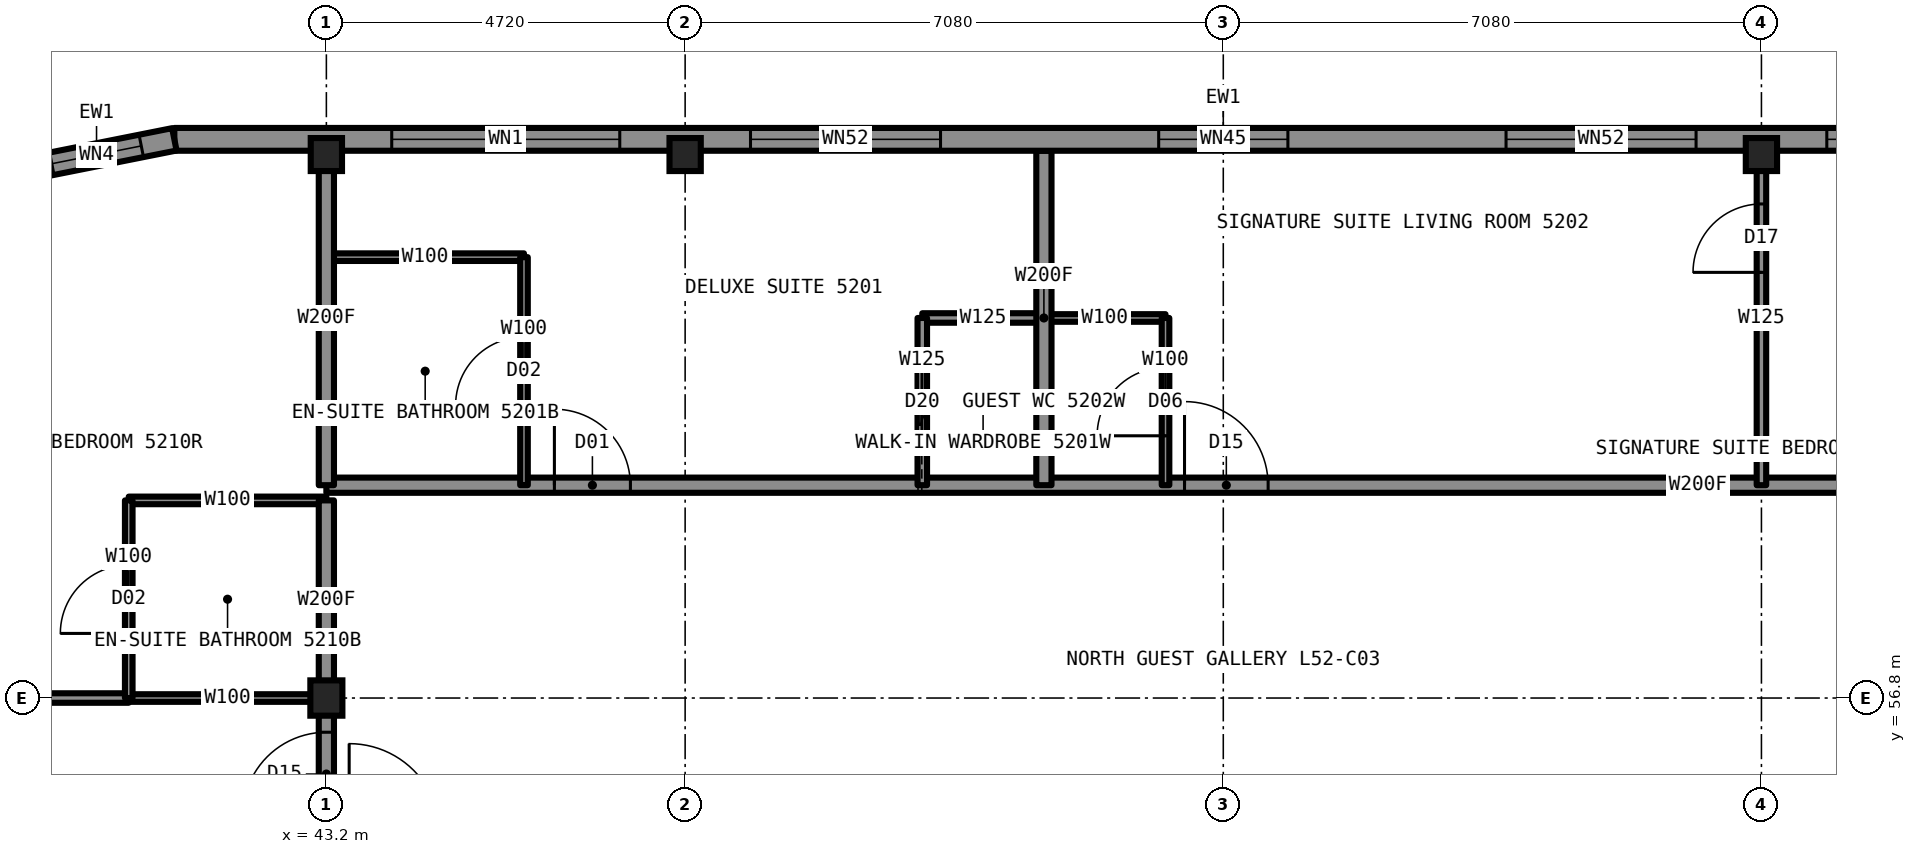
"""IFC4 building model, lengths in metres.
Left out: names, types, materials, properties, quantities, classifications, styles, units other than length and angle.
Written with IfcOpenShell. Run it as: python <this file> out.ifc"""

import sys

from ifc_helpers import new_model, si_unit, direction, frame, frame_2d, origin, origin_2d, place, context, subcontext, project, spatial, rectangle, i_section, extrude, element, fill, save


model = new_model("IFC4")
c1 = context("Model", 3, precision=1e-05, world=origin(), true_north=direction((0.0, 1.0)))
c2 = subcontext(c1, "Body", "Model", "MODEL_VIEW")
j1 = project(units=[si_unit("LENGTHUNIT", "METRE"), si_unit("PLANEANGLEUNIT", "RADIAN")], contexts=[c1])
p1 = place(None, origin())
s1 = spatial("IfcSite", under=j1, at=p1, CompositionType="ELEMENT")
p2 = place(p1, origin())
s2 = spatial("IfcBuilding", under=s1, at=p2, CompositionType="ELEMENT")
p3 = place(p2, frame((0.0, 0.0, 193.3)))
s3 = spatial("IfcBuildingStorey", under=s2, at=p3, CompositionType="ELEMENT", Elevation=193.3)
for number, where, z_axis, x_axis in (
    (1, (43.2, 63.95, 0.0), (0.0, 0.0, 1.0), (1.0, 0.0, 0.0)),
    (2, (47.92, 63.95, 0.0), (0.0, 0.0, 1.0), (1.0, 0.0, 0.0)),
    (3, (62.08, 63.95, 0.0), (0.0, 0.0, 1.0), (1.0, 0.0, 0.0)),
):
    element("IfcColumn", number, at=place(p3, frame(where, z_axis=z_axis, x_axis=x_axis)), inside=s3, PredefinedType="COLUMN", context=c2, shape_type="SweptSolid", body=[
        extrude(i_section(OverallWidth=0.411, OverallDepth=0.434, WebThickness=0.036, FlangeThickness=0.057, at=origin_2d()), origin(), (0.0, 0.0, 1.0), 3.5),
    ])
p4 = place(p3, frame((43.2, 56.8, 0.0), z_axis=(0.0, 0.0, 1.0), x_axis=(1.0, 0.0, 0.0)))
e4 = element("IfcColumn", 4, at=p4, inside=s3, PredefinedType="COLUMN", context=c2, shape_type="SweptSolid", body=[
    extrude(i_section(OverallWidth=0.422, OverallDepth=0.465, WebThickness=0.045, FlangeThickness=0.073, at=origin_2d()), origin(), (0.0, 0.0, 1.0), 3.5),
])
p5 = place(p3, frame((40.6, 56.8, 0.0), z_axis=(0.0, 0.0, 1.0), x_axis=(1.0, 0.0, 0.0)))
e5 = element("IfcWall", 5, at=p5, inside=s3, PredefinedType="PARTITIONING", context=c2, shape_type="SweptSolid", body=[
    extrude(rectangle(XDim=2.6, YDim=0.1, at=frame_2d((1.3, 0.0))), origin(), (0.0, 0.0, 1.0), 2.573),
])
p6 = place(p3, frame((36.0, 56.8, 0.0), z_axis=(0.0, 0.0, 1.0), x_axis=(1.0, 0.0, 0.0)))
e6 = element("IfcWall", 6, at=p6, inside=s3, PredefinedType="PARTITIONING", context=c2, shape_type="SweptSolid", body=[
    extrude(rectangle(XDim=4.6, YDim=0.125, at=frame_2d((2.3, 0.0))), origin(), (0.0, 0.0, 1.0), 2.573),
])
p7 = place(p6, frame((2.55, 0.0, 0.0)))
e7 = element("IfcOpeningElement", 7, at=p7, cuts=e6, PredefinedType="OPENING", context=c2, shape_type="SweptSolid", body=[
    extrude(rectangle(XDim=0.9, YDim=2.2, at=frame_2d((0.45, 1.1))), frame((0.0, 0.073, 0.0), z_axis=(0.0, -1.0, 0.0), x_axis=(1.0, 0.0, 0.0)), (0.0, 0.0, 1.0), 0.145),
])
p8 = place(p3, frame((40.6, 59.4, 0.0), z_axis=(0.0, 0.0, 1.0), x_axis=(1.0, 0.0, 0.0)))
e8 = element("IfcWall", 8, at=p8, inside=s3, PredefinedType="PARTITIONING", context=c2, shape_type="SweptSolid", body=[
    extrude(rectangle(XDim=2.6, YDim=0.1, at=frame_2d((1.3, 0.0))), origin(), (0.0, 0.0, 1.0), 3.33),
])
p9 = place(p3, frame((43.2, 59.6, 0.0), z_axis=(0.0, 0.0, 1.0), x_axis=(1.0, 0.0, 0.0)))
e9 = element("IfcWall", 9, at=p9, inside=s3, PredefinedType="PARTITIONING", context=c2, shape_type="SweptSolid", body=[
    extrude(rectangle(XDim=23.6, YDim=0.2, at=frame_2d((11.8, 0.0))), origin(), (0.0, 0.0, 1.0), 3.33),
])
p10 = place(p9, frame((3.0, 0.0, 0.0)))
e10 = element("IfcOpeningElement", 10, at=p10, cuts=e9, PredefinedType="OPENING", context=c2, shape_type="SweptSolid", body=[
    extrude(rectangle(XDim=1.0, YDim=2.2, at=frame_2d((0.5, 1.1))), frame((0.0, 0.11, 0.0), z_axis=(0.0, -1.0, 0.0), x_axis=(1.0, 0.0, 0.0)), (0.0, 0.0, 1.0), 0.22),
])
p11 = place(p9, frame((11.29, 0.0, 0.0)))
e11 = element("IfcOpeningElement", 11, at=p11, cuts=e9, PredefinedType="OPENING", context=c2, shape_type="SweptSolid", body=[
    extrude(rectangle(XDim=1.1, YDim=2.2, at=frame_2d((0.55, 1.1))), frame((0.0, 0.11, 0.0), z_axis=(0.0, -1.0, 0.0), x_axis=(1.0, 0.0, 0.0)), (0.0, 0.0, 1.0), 0.22),
])
p12 = place(p3, frame((52.64, 61.8, 0.0), z_axis=(0.0, 0.0, 1.0), x_axis=(1.0, 0.0, 0.0)))
e12 = element("IfcWall", 12, at=p12, inside=s3, PredefinedType="PARTITIONING", context=c2, shape_type="SweptSolid", body=[
    extrude(rectangle(XDim=1.6, YDim=0.1, at=frame_2d((0.8, 0.0))), origin(), (0.0, 0.0, 1.0), 3.33),
])
p13 = place(p3, frame((51.04, 61.8, 0.0), z_axis=(0.0, 0.0, 1.0), x_axis=(1.0, 0.0, 0.0)))
e13 = element("IfcWall", 13, at=p13, inside=s3, PredefinedType="PARTITIONING", context=c2, shape_type="SweptSolid", body=[
    extrude(rectangle(XDim=1.6, YDim=0.125, at=frame_2d((0.8, 0.0))), origin(), (0.0, 0.0, 1.0), 3.33),
])
p14 = place(p3, frame((43.2, 62.6, 0.0), z_axis=(0.0, 0.0, 1.0), x_axis=(1.0, 0.0, 0.0)))
e14 = element("IfcWall", 14, at=p14, inside=s3, PredefinedType="PARTITIONING", context=c2, shape_type="SweptSolid", body=[
    extrude(rectangle(XDim=2.6, YDim=0.1, at=frame_2d((1.3, 0.0))), origin(), (0.0, 0.0, 1.0), 3.33),
])
p15 = place(p3, frame((54.24, 59.6, 0.0), z_axis=(0.0, 0.0, 1.0), x_axis=(0.0, 1.0, 0.0)))
e15 = element("IfcWall", 15, at=p15, inside=s3, PredefinedType="PARTITIONING", context=c2, shape_type="SweptSolid", body=[
    extrude(rectangle(XDim=2.2, YDim=0.1, at=frame_2d((1.1, 0.0))), origin(), (0.0, 0.0, 1.0), 3.33),
])
p16 = place(p15, frame((0.65, 0.0, 0.0)))
e16 = element("IfcOpeningElement", 16, at=p16, cuts=e15, PredefinedType="OPENING", context=c2, shape_type="SweptSolid", body=[
    extrude(rectangle(XDim=0.9, YDim=2.1, at=frame_2d((0.45, 1.05))), frame((0.0, 0.06, 0.0), z_axis=(0.0, -1.0, 0.0), x_axis=(1.0, 0.0, 0.0)), (0.0, 0.0, 1.0), 0.12),
])
p17 = place(p3, frame((43.2, 33.22, 0.0), z_axis=(0.0, 0.0, 1.0), x_axis=(0.0, 1.0, 0.0)))
e17 = element("IfcWall", 17, at=p17, inside=s3, PredefinedType="PARTITIONING", context=c2, shape_type="SweptSolid", body=[
    extrude(rectangle(XDim=23.56, YDim=0.2, at=frame_2d((11.78, 0.0))), origin(), (0.0, 0.0, 1.0), 3.33),
])
p18 = place(p17, frame((7.25, 0.0, 0.0)))
e18 = element("IfcOpeningElement", 18, at=p18, cuts=e17, PredefinedType="OPENING", context=c2, shape_type="SweptSolid", body=[
    extrude(rectangle(XDim=1.0, YDim=2.2, at=frame_2d((0.5, 1.1))), frame((0.0, 0.11, 0.0), z_axis=(0.0, -1.0, 0.0), x_axis=(1.0, 0.0, 0.0)), (0.0, 0.0, 1.0), 0.22),
])
p19 = place(p17, frame((12.42, 0.0, 0.0)))
e19 = element("IfcOpeningElement", 19, at=p19, cuts=e17, PredefinedType="OPENING", context=c2, shape_type="SweptSolid", body=[
    extrude(rectangle(XDim=1.0, YDim=2.2, at=frame_2d((0.5, 1.1))), frame((0.0, 0.11, 0.0), z_axis=(0.0, -1.0, 0.0), x_axis=(1.0, 0.0, 0.0)), (0.0, 0.0, 1.0), 0.22),
])
p20 = place(p17, frame((22.03, 0.0, 0.0)))
e20 = element("IfcOpeningElement", 20, at=p20, cuts=e17, PredefinedType="OPENING", context=c2, shape_type="SweptSolid", body=[
    extrude(rectangle(XDim=1.1, YDim=2.2, at=frame_2d((0.55, 1.1))), frame((0.0, 0.11, 0.0), z_axis=(0.0, -1.0, 0.0), x_axis=(1.0, 0.0, 0.0)), (0.0, 0.0, 1.0), 0.22),
])
p21 = place(p17, frame((0.63, 0.0, 0.0)))
e21 = element("IfcOpeningElement", 21, at=p21, cuts=e17, PredefinedType="OPENING", context=c2, shape_type="SweptSolid", body=[
    extrude(rectangle(XDim=1.1, YDim=2.2, at=frame_2d((0.55, 1.1))), frame((0.0, 0.11, 0.0), z_axis=(0.0, -1.0, 0.0), x_axis=(1.0, 0.0, 0.0)), (0.0, 0.0, 1.0), 0.22),
])
p22 = place(p3, frame((43.2, 59.6, 0.0), z_axis=(0.0, 0.0, 1.0), x_axis=(0.0, 1.0, 0.0)))
e22 = element("IfcWall", 22, at=p22, inside=s3, PredefinedType="PARTITIONING", context=c2, shape_type="SweptSolid", body=[
    extrude(rectangle(XDim=4.4, YDim=0.2, at=frame_2d((2.2, 0.0))), origin(), (0.0, 0.0, 1.0), 2.573),
])
p23 = place(p3, frame((40.6, 56.8, 0.0), z_axis=(0.0, 0.0, 1.0), x_axis=(0.0, 1.0, 0.0)))
e23 = element("IfcWall", 23, at=p23, inside=s3, PredefinedType="PARTITIONING", context=c2, shape_type="SweptSolid", body=[
    extrude(rectangle(XDim=2.6, YDim=0.1, at=frame_2d((1.3, 0.0))), origin(), (0.0, 0.0, 1.0), 3.33),
])
p24 = place(p23, frame((0.85, 0.0, 0.0)))
e24 = element("IfcOpeningElement", 24, at=p24, cuts=e23, PredefinedType="OPENING", context=c2, shape_type="SweptSolid", body=[
    extrude(rectangle(XDim=0.9, YDim=2.1, at=frame_2d((0.45, 1.05))), frame((0.0, 0.06, 0.0), z_axis=(0.0, -1.0, 0.0), x_axis=(1.0, 0.0, 0.0)), (0.0, 0.0, 1.0), 0.12),
])
p25 = place(p3, frame((52.64, 59.6, 0.0), z_axis=(0.0, 0.0, 1.0), x_axis=(0.0, 1.0, 0.0)))
e25 = element("IfcWall", 25, at=p25, inside=s3, PredefinedType="PARTITIONING", context=c2, shape_type="SweptSolid", body=[
    extrude(rectangle(XDim=4.4, YDim=0.2, at=frame_2d((2.2, 0.0))), origin(), (0.0, 0.0, 1.0), 3.33),
])
p26 = place(p3, frame((51.04, 59.6, 0.0), z_axis=(0.0, 0.0, 1.0), x_axis=(0.0, 1.0, 0.0)))
e26 = element("IfcWall", 26, at=p26, inside=s3, PredefinedType="PARTITIONING", context=c2, shape_type="SweptSolid", body=[
    extrude(rectangle(XDim=2.2, YDim=0.125, at=frame_2d((1.1, 0.0))), origin(), (0.0, 0.0, 1.0), 3.33),
])
p27 = place(p26, frame((0.7, 0.0, 0.0)))
e27 = element("IfcOpeningElement", 27, at=p27, cuts=e26, PredefinedType="OPENING", context=c2, shape_type="SweptSolid", body=[
    extrude(rectangle(XDim=0.8, YDim=2.1, at=frame_2d((0.4, 1.05))), frame((0.0, 0.073, 0.0), z_axis=(0.0, -1.0, 0.0), x_axis=(1.0, 0.0, 0.0)), (0.0, 0.0, 1.0), 0.145),
])
p28 = place(p3, frame((45.8, 59.6, 0.0), z_axis=(0.0, 0.0, 1.0), x_axis=(0.0, 1.0, 0.0)))
e28 = element("IfcWall", 28, at=p28, inside=s3, PredefinedType="PARTITIONING", context=c2, shape_type="SweptSolid", body=[
    extrude(rectangle(XDim=3.0, YDim=0.1, at=frame_2d((1.5, 0.0))), origin(), (0.0, 0.0, 1.0), 3.33),
])
p29 = place(p28, frame((1.05, 0.0, 0.0)))
e29 = element("IfcOpeningElement", 29, at=p29, cuts=e28, PredefinedType="OPENING", context=c2, shape_type="SweptSolid", body=[
    extrude(rectangle(XDim=0.9, YDim=2.1, at=frame_2d((0.45, 1.05))), frame((0.0, 0.06, 0.0), z_axis=(0.0, -1.0, 0.0), x_axis=(1.0, 0.0, 0.0)), (0.0, 0.0, 1.0), 0.12),
])
p30 = place(p3, frame((62.08, 59.6, 0.0), z_axis=(0.0, 0.0, 1.0), x_axis=(0.0, 1.0, 0.0)))
e30 = element("IfcWall", 30, at=p30, inside=s3, PredefinedType="PARTITIONING", context=c2, shape_type="SweptSolid", body=[
    extrude(rectangle(XDim=4.4, YDim=0.125, at=frame_2d((2.2, 0.0))), origin(), (0.0, 0.0, 1.0), 2.573),
])
p31 = place(p30, frame((2.8, 0.0, 0.0)))
e31 = element("IfcOpeningElement", 31, at=p31, cuts=e30, PredefinedType="OPENING", context=c2, shape_type="SweptSolid", body=[
    extrude(rectangle(XDim=0.9, YDim=2.2, at=frame_2d((0.45, 1.1))), frame((0.0, 0.073, 0.0), z_axis=(0.0, -1.0, 0.0), x_axis=(1.0, 0.0, 0.0)), (0.0, 0.0, 1.0), 0.145),
])
p32 = place(p3, frame((68.8, 64.15, 0.0), z_axis=(0.0, 0.0, 1.0), x_axis=(-1.0, 0.0, 0.0)))
e32 = element("IfcWall", 32, at=p32, inside=s3, PredefinedType="SOLIDWALL", context=c2, shape_type="SweptSolid", body=[
    extrude(rectangle(XDim=27.6, YDim=0.3, at=frame_2d((13.8, 0.0))), origin(), (0.0, 0.0, 1.0), 2.83),
])
p33 = place(p32, frame((2.86, 0.0, 0.3)))
e33 = element("IfcOpeningElement", 33, at=p33, cuts=e32, PredefinedType="OPENING", context=c2, shape_type="SweptSolid", body=[
    extrude(rectangle(XDim=3.0, YDim=2.0, at=frame_2d((1.5, 1.0))), frame((0.0, 0.16, 0.0), z_axis=(0.0, -1.0, 0.0), x_axis=(1.0, 0.0, 0.0)), (0.0, 0.0, 1.0), 0.32),
])
p34 = place(p32, frame((7.58, 0.0, 0.3)))
e34 = element("IfcOpeningElement", 34, at=p34, cuts=e32, PredefinedType="OPENING", context=c2, shape_type="SweptSolid", body=[
    extrude(rectangle(XDim=2.5, YDim=2.0, at=frame_2d((1.25, 1.0))), frame((0.0, 0.16, 0.0), z_axis=(0.0, -1.0, 0.0), x_axis=(1.0, 0.0, 0.0)), (0.0, 0.0, 1.0), 0.32),
])
p35 = place(p32, frame((12.95, 0.0, 1.0)))
e35 = element("IfcOpeningElement", 35, at=p35, cuts=e32, PredefinedType="OPENING", context=c2, shape_type="SweptSolid", body=[
    extrude(rectangle(XDim=1.7, YDim=1.3, at=frame_2d((0.85, 0.65))), frame((0.0, 0.16, 0.0), z_axis=(0.0, -1.0, 0.0), x_axis=(1.0, 0.0, 0.0)), (0.0, 0.0, 1.0), 0.32),
])
p36 = place(p32, frame((17.52, 0.0, 0.3)))
e36 = element("IfcOpeningElement", 36, at=p36, cuts=e32, PredefinedType="OPENING", context=c2, shape_type="SweptSolid", body=[
    extrude(rectangle(XDim=2.5, YDim=2.0, at=frame_2d((1.25, 1.0))), frame((0.0, 0.16, 0.0), z_axis=(0.0, -1.0, 0.0), x_axis=(1.0, 0.0, 0.0)), (0.0, 0.0, 1.0), 0.32),
])
p37 = place(p32, frame((21.74, 0.0, 0.3)))
e37 = element("IfcOpeningElement", 37, at=p37, cuts=e32, PredefinedType="OPENING", context=c2, shape_type="SweptSolid", body=[
    extrude(rectangle(XDim=3.0, YDim=2.0, at=frame_2d((1.5, 1.0))), frame((0.0, 0.16, 0.0), z_axis=(0.0, -1.0, 0.0), x_axis=(1.0, 0.0, 0.0)), (0.0, 0.0, 1.0), 0.32),
])
p38 = place(p3, frame((41.2, 64.15, 0.0), z_axis=(0.0, 0.0, 1.0), x_axis=(-0.980787050784, -0.195081421501, 0.0)))
e38 = element("IfcWall", 38, at=p38, inside=s3, PredefinedType="SOLIDWALL", context=c2, shape_type="SweptSolid", body=[
    extrude(rectangle(XDim=2.087, YDim=0.3, at=frame_2d((1.044, 0.0))), origin(), (0.0, 0.0, 1.0), 3.33),
])
p39 = place(p38, frame((0.444, 0.0, 0.3)))
e39 = element("IfcOpeningElement", 39, at=p39, cuts=e38, PredefinedType="OPENING", context=c2, shape_type="SweptSolid", body=[
    extrude(rectangle(XDim=1.2, YDim=2.0, at=frame_2d((0.6, 1.0))), frame((0.0, 0.16, 0.0), z_axis=(0.0, -1.0, 0.0), x_axis=(1.0, 0.0, 0.0)), (0.0, 0.0, 1.0), 0.32),
])
p40 = place(p3, frame((43.2, 56.78, 0.0), z_axis=(0.0, 0.0, 1.0), x_axis=(0.0, 1.0, 0.0)))
e40 = element("IfcWall", 40, at=p40, inside=s3, PredefinedType="PARTITIONING", context=c2, shape_type="SweptSolid", body=[
    extrude(rectangle(XDim=2.62, YDim=0.2, at=frame_2d((1.31, 0.0))), origin(), (0.0, 0.0, 1.0), 2.573),
])
p41 = place(p10, origin())
e41 = element("IfcDoor", 41, at=p41, inside=s3, OperationType="SINGLE_SWING_LEFT", PredefinedType="DOOR", context=c2, shape_type="SweptSolid", body=[
    extrude(rectangle(XDim=1.0, YDim=2.2, at=frame_2d((0.5, 1.1))), frame((0.0, 0.025, 0.0), z_axis=(0.0, -1.0, 0.0), x_axis=(1.0, 0.0, 0.0)), (0.0, 0.0, 1.0), 0.05),
])
fill(e10, e41)
p42 = place(p29, origin())
e42 = element("IfcDoor", 42, at=p42, inside=s3, OperationType="SINGLE_SWING_RIGHT", PredefinedType="DOOR", context=c2, shape_type="SweptSolid", body=[
    extrude(rectangle(XDim=0.9, YDim=2.1, at=frame_2d((0.45, 1.05))), frame((0.0, 0.025, 0.0), z_axis=(0.0, -1.0, 0.0), x_axis=(1.0, 0.0, 0.0)), (0.0, 0.0, 1.0), 0.05),
])
fill(e29, e42)
p43 = place(p27, origin())
e43 = element("IfcDoor", 43, at=p43, inside=s3, OperationType="SLIDING_TO_LEFT", PredefinedType="DOOR", context=c2, shape_type="SweptSolid", body=[
    extrude(rectangle(XDim=0.8, YDim=2.1, at=frame_2d((0.4, 1.05))), frame((0.0, 0.025, 0.0), z_axis=(0.0, -1.0, 0.0), x_axis=(1.0, 0.0, 0.0)), (0.0, 0.0, 1.0), 0.05),
])
fill(e27, e43)
p44 = place(p11, origin())
e44 = element("IfcDoor", 44, at=p44, inside=s3, OperationType="SINGLE_SWING_LEFT", PredefinedType="DOOR", context=c2, shape_type="SweptSolid", body=[
    extrude(rectangle(XDim=1.1, YDim=2.2, at=frame_2d((0.55, 1.1))), frame((0.0, 0.025, 0.0), z_axis=(0.0, -1.0, 0.0), x_axis=(1.0, 0.0, 0.0)), (0.0, 0.0, 1.0), 0.05),
])
fill(e11, e44)
p45 = place(p31, origin())
e45 = element("IfcDoor", 45, at=p45, inside=s3, OperationType="SINGLE_SWING_LEFT", PredefinedType="DOOR", context=c2, shape_type="SweptSolid", body=[
    extrude(rectangle(XDim=0.9, YDim=2.2, at=frame_2d((0.45, 1.1))), frame((0.0, 0.025, 0.0), z_axis=(0.0, -1.0, 0.0), x_axis=(1.0, 0.0, 0.0)), (0.0, 0.0, 1.0), 0.05),
])
fill(e31, e45)
p46 = place(p16, origin())
e46 = element("IfcDoor", 46, at=p46, inside=s3, OperationType="SINGLE_SWING_LEFT", PredefinedType="DOOR", context=c2, shape_type="SweptSolid", body=[
    extrude(rectangle(XDim=0.9, YDim=2.1, at=frame_2d((0.45, 1.05))), frame((0.0, 0.025, 0.0), z_axis=(0.0, -1.0, 0.0), x_axis=(1.0, 0.0, 0.0)), (0.0, 0.0, 1.0), 0.05),
])
fill(e16, e46)
p47 = place(p20, origin())
e47 = element("IfcDoor", 47, at=p47, inside=s3, OperationType="SINGLE_SWING_LEFT", PredefinedType="DOOR", context=c2, shape_type="SweptSolid", body=[
    extrude(rectangle(XDim=1.1, YDim=2.2, at=frame_2d((0.55, 1.1))), frame((0.0, 0.025, 0.0), z_axis=(0.0, -1.0, 0.0), x_axis=(1.0, 0.0, 0.0)), (0.0, 0.0, 1.0), 0.05),
])
fill(e20, e47)
p48 = place(p24, origin())
e48 = element("IfcDoor", 48, at=p48, inside=s3, OperationType="SINGLE_SWING_RIGHT", PredefinedType="DOOR", context=c2, shape_type="SweptSolid", body=[
    extrude(rectangle(XDim=0.9, YDim=2.1, at=frame_2d((0.45, 1.05))), frame((0.0, 0.025, 0.0), z_axis=(0.0, -1.0, 0.0), x_axis=(1.0, 0.0, 0.0)), (0.0, 0.0, 1.0), 0.05),
])
fill(e24, e48)
p49 = place(p33, origin())
e49 = element("IfcWindow", 49, at=p49, inside=s3, PartitioningType="SINGLE_PANEL", PredefinedType="WINDOW", context=c2, shape_type="SweptSolid", body=[
    extrude(rectangle(XDim=3.0, YDim=2.0, at=frame_2d((1.5, 1.0))), frame((0.0, 0.13, 0.0), z_axis=(0.0, -1.0, 0.0), x_axis=(1.0, 0.0, 0.0)), (0.0, 0.0, 1.0), 0.06),
])
fill(e33, e49)
p50 = place(p34, origin())
e50 = element("IfcWindow", 50, at=p50, inside=s3, PartitioningType="SINGLE_PANEL", PredefinedType="WINDOW", context=c2, shape_type="SweptSolid", body=[
    extrude(rectangle(XDim=2.5, YDim=2.0, at=frame_2d((1.25, 1.0))), frame((0.0, 0.13, 0.0), z_axis=(0.0, -1.0, 0.0), x_axis=(1.0, 0.0, 0.0)), (0.0, 0.0, 1.0), 0.06),
])
fill(e34, e50)
p51 = place(p35, origin())
e51 = element("IfcWindow", 51, at=p51, inside=s3, PartitioningType="SINGLE_PANEL", PredefinedType="WINDOW", context=c2, shape_type="SweptSolid", body=[
    extrude(rectangle(XDim=1.7, YDim=1.3, at=frame_2d((0.85, 0.65))), frame((0.0, 0.13, 0.0), z_axis=(0.0, -1.0, 0.0), x_axis=(1.0, 0.0, 0.0)), (0.0, 0.0, 1.0), 0.06),
])
fill(e35, e51)
p52 = place(p36, origin())
e52 = element("IfcWindow", 52, at=p52, inside=s3, PartitioningType="SINGLE_PANEL", PredefinedType="WINDOW", context=c2, shape_type="SweptSolid", body=[
    extrude(rectangle(XDim=2.5, YDim=2.0, at=frame_2d((1.25, 1.0))), frame((0.0, 0.13, 0.0), z_axis=(0.0, -1.0, 0.0), x_axis=(1.0, 0.0, 0.0)), (0.0, 0.0, 1.0), 0.06),
])
fill(e36, e52)
p53 = place(p37, origin())
e53 = element("IfcWindow", 53, at=p53, inside=s3, PartitioningType="SINGLE_PANEL", PredefinedType="WINDOW", context=c2, shape_type="SweptSolid", body=[
    extrude(rectangle(XDim=3.0, YDim=2.0, at=frame_2d((1.5, 1.0))), frame((0.0, 0.13, 0.0), z_axis=(0.0, -1.0, 0.0), x_axis=(1.0, 0.0, 0.0)), (0.0, 0.0, 1.0), 0.06),
])
fill(e37, e53)
p54 = place(p39, origin())
e54 = element("IfcWindow", 54, at=p54, inside=s3, PartitioningType="SINGLE_PANEL", PredefinedType="WINDOW", context=c2, shape_type="SweptSolid", body=[
    extrude(rectangle(XDim=1.2, YDim=2.0, at=frame_2d((0.6, 1.0))), frame((0.0, 0.13, 0.0), z_axis=(0.0, -1.0, 0.0), x_axis=(1.0, 0.0, 0.0)), (0.0, 0.0, 1.0), 0.06),
])
fill(e39, e54)
save(model, sys.argv[1])
